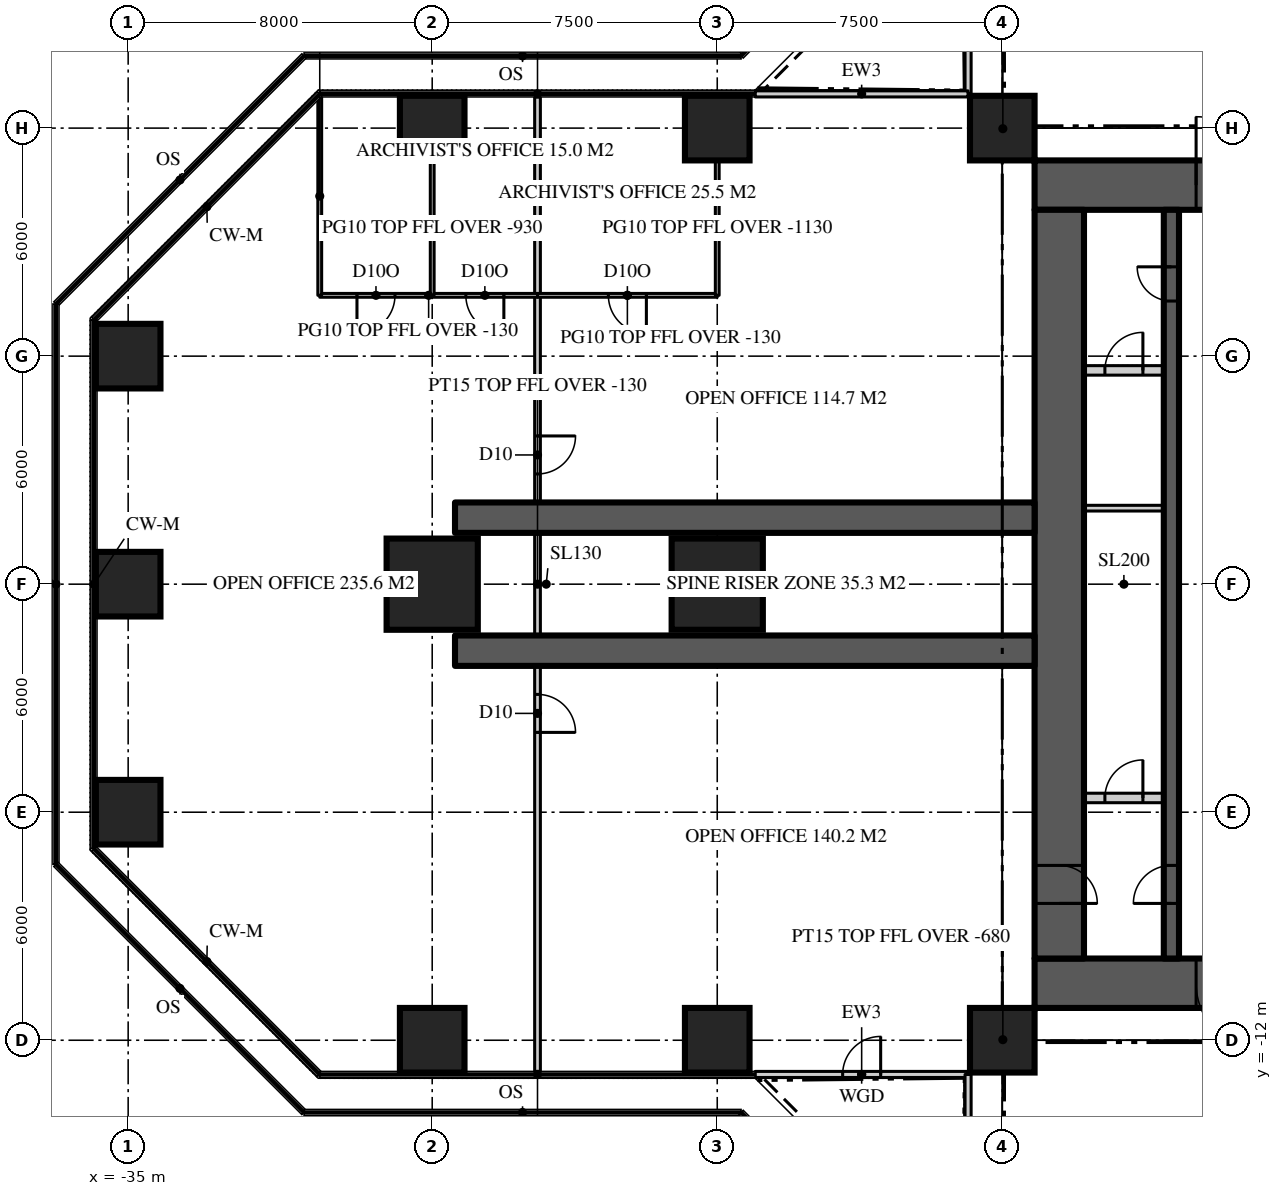
"""IFC4 building model, lengths in metres.
Left out: names, types, materials, properties, quantities, classifications, styles, units other than length and angle.
Written with IfcOpenShell. Run it as: python <this file> out.ifc"""

import sys

from ifc_helpers import new_model, si_unit, direction, frame, frame_2d, origin, origin_2d, place, context, subcontext, project, spatial, rectangle, extrude, element, fill, save


model = new_model("IFC4")
c1 = context("Model", 3, precision=1e-05, world=origin(), true_north=direction((0.0, 1.0)))
c2 = subcontext(c1, "Body", "Model", "MODEL_VIEW")
j1 = project(units=[si_unit("LENGTHUNIT", "METRE"), si_unit("PLANEANGLEUNIT", "RADIAN")], contexts=[c1])
p1 = place(None, origin())
s1 = spatial("IfcSite", under=j1, at=p1, CompositionType="ELEMENT")
p2 = place(p1, origin())
s2 = spatial("IfcBuilding", under=s1, at=p2, CompositionType="ELEMENT")
p3 = place(p2, frame((0.0, 0.0, 159.3)))
s3 = spatial("IfcBuildingStorey", under=s2, at=p3, CompositionType="ELEMENT", Elevation=159.3)
p4 = place(p3, frame((-11.15, 10.5, 0.0), z_axis=(0.0, 0.0, 1.0), x_axis=(1.0, 0.0, 0.0)))
e1 = element("IfcWall", 1, at=p4, inside=s3, PredefinedType="SHEAR", context=c2, shape_type="SweptSolid", body=[
    extrude(rectangle(XDim=22.3, YDim=1.3, at=frame_2d((11.15, 0.0))), origin(), (0.0, 0.0, 1.0), 3.9),
])
p5 = place(p4, frame((4.25, 0.0, 0.0)))
e2 = element("IfcOpeningElement", 2, at=p5, cuts=e1, PredefinedType="OPENING", context=c2, shape_type="SweptSolid", body=[
    extrude(rectangle(XDim=1.8, YDim=2.2, at=frame_2d((0.9, 1.1))), frame((0.0, 0.66, 0.0), z_axis=(0.0, -1.0, 0.0), x_axis=(1.0, 0.0, 0.0)), (0.0, 0.0, 1.0), 1.32),
])
p6 = place(p4, frame((16.25, 0.0, 0.0)))
e3 = element("IfcOpeningElement", 3, at=p6, cuts=e1, PredefinedType="OPENING", context=c2, shape_type="SweptSolid", body=[
    extrude(rectangle(XDim=1.8, YDim=2.2, at=frame_2d((0.9, 1.1))), frame((0.0, 0.66, 0.0), z_axis=(0.0, -1.0, 0.0), x_axis=(1.0, 0.0, 0.0)), (0.0, 0.0, 1.0), 1.32),
])
p7 = place(p3, frame((11.15, -10.5, 0.0), z_axis=(0.0, 0.0, 1.0), x_axis=(-1.0, 0.0, 0.0)))
e4 = element("IfcWall", 4, at=p7, inside=s3, PredefinedType="SHEAR", context=c2, shape_type="SweptSolid", body=[
    extrude(rectangle(XDim=22.3, YDim=1.3, at=frame_2d((11.15, 0.0))), origin(), (0.0, 0.0, 1.0), 3.9),
])
p8 = place(p7, frame((16.25, 0.0, 0.0)))
e5 = element("IfcOpeningElement", 5, at=p8, cuts=e4, PredefinedType="OPENING", context=c2, shape_type="SweptSolid", body=[
    extrude(rectangle(XDim=1.8, YDim=2.2, at=frame_2d((0.9, 1.1))), frame((0.0, 0.66, 0.0), z_axis=(0.0, -1.0, 0.0), x_axis=(1.0, 0.0, 0.0)), (0.0, 0.0, 1.0), 1.32),
])
p9 = place(p7, frame((4.25, 0.0, 0.0)))
e6 = element("IfcOpeningElement", 6, at=p9, cuts=e4, PredefinedType="OPENING", context=c2, shape_type="SweptSolid", body=[
    extrude(rectangle(XDim=1.8, YDim=2.2, at=frame_2d((0.9, 1.1))), frame((0.0, 0.66, 0.0), z_axis=(0.0, -1.0, 0.0), x_axis=(1.0, 0.0, 0.0)), (0.0, 0.0, 1.0), 1.32),
])
p10 = place(p3, frame((-10.5, 9.85, 0.0), z_axis=(0.0, 0.0, 1.0), x_axis=(0.0, -1.0, 0.0)))
e7 = element("IfcWall", 7, at=p10, inside=s3, PredefinedType="SHEAR", context=c2, shape_type="SweptSolid", body=[
    extrude(rectangle(XDim=19.7, YDim=1.3, at=frame_2d((9.85, 0.0))), origin(), (0.0, 0.0, 1.0), 3.9),
])
p11 = place(p10, frame((17.25, 0.0, 0.0)))
e8 = element("IfcOpeningElement", 8, at=p11, cuts=e7, PredefinedType="OPENING", context=c2, shape_type="SweptSolid", body=[
    extrude(rectangle(XDim=1.0, YDim=2.2, at=frame_2d((0.5, 1.1))), frame((0.0, 0.66, 0.0), z_axis=(0.0, -1.0, 0.0), x_axis=(1.0, 0.0, 0.0)), (0.0, 0.0, 1.0), 1.32),
])
for number, where, z_axis, x_axis in (
    (9, (-11.15, 1.75, 0.0), (0.0, 0.0, 1.0), (-1.0, 0.0, 0.0)),
    (10, (-11.15, -1.75, 0.0), (0.0, 0.0, 1.0), (-1.0, 0.0, 0.0)),
):
    element("IfcWall", number, at=place(p3, frame(where, z_axis=z_axis, x_axis=x_axis)), inside=s3, PredefinedType="SHEAR", context=c2, shape_type="SweptSolid", body=[
        extrude(rectangle(XDim=15.25, YDim=0.8, at=frame_2d((7.625, 0.0))), origin(), (0.0, 0.0, 1.0), 3.9),
    ])
for number, where, z_axis, x_axis in (
    (11, (-27.0, -12.0, 0.0), (0.0, 0.0, 1.0), (1.0, 0.0, 0.0)),
    (12, (-19.5, -12.0, 0.0), (0.0, 0.0, 1.0), (1.0, 0.0, 0.0)),
    (13, (-12.0, -12.0, 0.0), (0.0, 0.0, 1.0), (1.0, 0.0, 0.0)),
    (14, (-35.0, -6.0, 0.0), (0.0, 0.0, 1.0), (1.0, 0.0, 0.0)),
    (15, (-35.0, 0.0, 0.0), (0.0, 0.0, 1.0), (1.0, 0.0, 0.0)),
):
    element("IfcColumn", number, at=place(p3, frame(where, z_axis=z_axis, x_axis=x_axis)), inside=s3, PredefinedType="COLUMN", context=c2, shape_type="SweptSolid", body=[
        extrude(rectangle(XDim=1.7, YDim=1.7, at=origin_2d()), origin(), (0.0, 0.0, 1.0), 3.9),
    ])
for number, where, z_axis, x_axis in (
    (16, (-27.0, 0.0, 0.0), (0.0, 0.0, 1.0), (1.0, 0.0, 0.0)),
    (17, (-19.5, 0.0, 0.0), (0.0, 0.0, 1.0), (1.0, 0.0, 0.0)),
):
    element("IfcColumn", number, at=place(p3, frame(where, z_axis=z_axis, x_axis=x_axis)), inside=s3, PredefinedType="COLUMN", context=c2, shape_type="SweptSolid", body=[
        extrude(rectangle(XDim=2.4, YDim=2.4, at=origin_2d()), origin(), (0.0, 0.0, 1.0), 3.9),
    ])
for number, where, z_axis, x_axis in (
    (18, (-35.0, 6.0, 0.0), (0.0, 0.0, 1.0), (1.0, 0.0, 0.0)),
    (19, (-27.0, 12.0, 0.0), (0.0, 0.0, 1.0), (1.0, 0.0, 0.0)),
    (20, (-19.5, 12.0, 0.0), (0.0, 0.0, 1.0), (1.0, 0.0, 0.0)),
    (21, (-12.0, 12.0, 0.0), (0.0, 0.0, 1.0), (1.0, 0.0, 0.0)),
):
    element("IfcColumn", number, at=place(p3, frame(where, z_axis=z_axis, x_axis=x_axis)), inside=s3, PredefinedType="COLUMN", context=c2, shape_type="SweptSolid", body=[
        extrude(rectangle(XDim=1.7, YDim=1.7, at=origin_2d()), origin(), (0.0, 0.0, 1.0), 3.9),
    ])
p12 = place(p3, frame((-12.9, 18.5, 0.0), z_axis=(0.0, 0.0, 1.0), x_axis=(0.0, -1.0, 0.0)))
e22 = element("IfcWall", 22, at=p12, inside=s3, PredefinedType="SOLIDWALL", context=c2, shape_type="SweptSolid", body=[
    extrude(rectangle(XDim=5.6, YDim=0.16, at=frame_2d((2.8, 0.0))), origin(), (0.0, 0.0, 1.0), 3.77),
])
p13 = place(p12, frame((2.3, 0.0, 0.0)))
e23 = element("IfcOpeningElement", 23, at=p13, cuts=e22, PredefinedType="OPENING", context=c2, shape_type="SweptSolid", body=[
    extrude(rectangle(XDim=1.0, YDim=2.2, at=frame_2d((0.5, 1.1))), frame((0.0, 0.09, 0.0), z_axis=(0.0, -1.0, 0.0), x_axis=(1.0, 0.0, 0.0)), (0.0, 0.0, 1.0), 0.18),
])
p14 = place(p3, frame((-12.9, 12.9, 0.0), z_axis=(0.0, 0.0, 1.0), x_axis=(-1.0, 0.0, 0.0)))
e24 = element("IfcWall", 24, at=p14, inside=s3, PredefinedType="SOLIDWALL", context=c2, shape_type="SweptSolid", body=[
    extrude(rectangle(XDim=5.6, YDim=0.16, at=frame_2d((2.8, 0.0))), origin(), (0.0, 0.0, 1.0), 3.77),
])
p15 = place(p3, frame((-18.5, -12.9, 0.0), z_axis=(0.0, 0.0, 1.0), x_axis=(1.0, 0.0, 0.0)))
e25 = element("IfcWall", 25, at=p15, inside=s3, PredefinedType="SOLIDWALL", context=c2, shape_type="SweptSolid", body=[
    extrude(rectangle(XDim=5.6, YDim=0.16, at=frame_2d((2.8, 0.0))), origin(), (0.0, 0.0, 1.0), 3.77),
])
p16 = place(p15, frame((2.3, 0.0, 0.0)))
e26 = element("IfcOpeningElement", 26, at=p16, cuts=e25, PredefinedType="OPENING", context=c2, shape_type="SweptSolid", body=[
    extrude(rectangle(XDim=1.0, YDim=2.2, at=frame_2d((0.5, 1.1))), frame((0.0, 0.09, 0.0), z_axis=(0.0, -1.0, 0.0), x_axis=(1.0, 0.0, 0.0)), (0.0, 0.0, 1.0), 0.18),
])
p17 = place(p3, frame((-12.9, -12.9, 0.0), z_axis=(0.0, 0.0, 1.0), x_axis=(0.0, -1.0, 0.0)))
e27 = element("IfcWall", 27, at=p17, inside=s3, PredefinedType="SOLIDWALL", context=c2, shape_type="SweptSolid", body=[
    extrude(rectangle(XDim=5.6, YDim=0.16, at=frame_2d((2.8, 0.0))), origin(), (0.0, 0.0, 1.0), 3.77),
])
p18 = place(p3, frame((-7.55, -9.85, 0.0), z_axis=(0.0, 0.0, 1.0), x_axis=(0.0, 1.0, 0.0)))
e28 = element("IfcWall", 28, at=p18, inside=s3, PredefinedType="SHEAR", context=c2, shape_type="SweptSolid", body=[
    extrude(rectangle(XDim=19.7, YDim=0.4, at=frame_2d((9.85, 0.0))), origin(), (0.0, 0.0, 1.0), 3.9),
])
p19 = place(p18, frame((1.45, 0.0, 0.0)))
e29 = element("IfcOpeningElement", 29, at=p19, cuts=e28, PredefinedType="OPENING", context=c2, shape_type="SweptSolid", body=[
    extrude(rectangle(XDim=1.0, YDim=2.2, at=frame_2d((0.5, 1.1))), frame((0.0, 0.21, 0.0), z_axis=(0.0, -1.0, 0.0), x_axis=(1.0, 0.0, 0.0)), (0.0, 0.0, 1.0), 0.42),
])
p20 = place(p18, frame((17.3, 0.0, 0.0)))
e30 = element("IfcOpeningElement", 30, at=p20, cuts=e28, PredefinedType="OPENING", context=c2, shape_type="SweptSolid", body=[
    extrude(rectangle(XDim=0.9, YDim=2.1, at=frame_2d((0.45, 1.05))), frame((0.0, 0.21, 0.0), z_axis=(0.0, -1.0, 0.0), x_axis=(1.0, 0.0, 0.0)), (0.0, 0.0, 1.0), 0.42),
])
p21 = place(p3, frame((-9.85, 5.625, 0.0), z_axis=(0.0, 0.0, 1.0), x_axis=(1.0, 0.0, 0.0)))
e31 = element("IfcWall", 31, at=p21, inside=s3, PredefinedType="SOLIDWALL", context=c2, shape_type="SweptSolid", body=[
    extrude(rectangle(XDim=2.1, YDim=0.25, at=frame_2d((1.05, 0.0))), origin(), (0.0, 0.0, 1.0), 3.7),
])
p22 = place(p21, frame((0.55, 0.0, 0.0)))
e32 = element("IfcOpeningElement", 32, at=p22, cuts=e31, PredefinedType="OPENING", context=c2, shape_type="SweptSolid", body=[
    extrude(rectangle(XDim=1.0, YDim=2.2, at=frame_2d((0.5, 1.1))), frame((0.0, 0.135, 0.0), z_axis=(0.0, -1.0, 0.0), x_axis=(1.0, 0.0, 0.0)), (0.0, 0.0, 1.0), 0.27),
])
p23 = place(p3, frame((-9.85, -5.625, 0.0), z_axis=(0.0, 0.0, 1.0), x_axis=(1.0, 0.0, 0.0)))
e33 = element("IfcWall", 33, at=p23, inside=s3, PredefinedType="SOLIDWALL", context=c2, shape_type="SweptSolid", body=[
    extrude(rectangle(XDim=2.1, YDim=0.25, at=frame_2d((1.05, 0.0))), origin(), (0.0, 0.0, 1.0), 3.7),
])
p24 = place(p23, frame((0.55, 0.0, 0.0)))
e34 = element("IfcOpeningElement", 34, at=p24, cuts=e33, PredefinedType="OPENING", context=c2, shape_type="SweptSolid", body=[
    extrude(rectangle(XDim=1.0, YDim=2.2, at=frame_2d((0.5, 1.1))), frame((0.0, 0.135, 0.0), z_axis=(0.0, -1.0, 0.0), x_axis=(1.0, 0.0, 0.0)), (0.0, 0.0, 1.0), 0.27),
])
p25 = place(p3, frame((-24.229, 12.82, 0.0), z_axis=(0.0, 0.0, 1.0), x_axis=(0.0, -1.0, 0.0)))
e35 = element("IfcWall", 35, at=p25, inside=s3, PredefinedType="PARTITIONING", context=c2, shape_type="SweptSolid", body=[
    extrude(rectangle(XDim=25.64, YDim=0.15, at=frame_2d((12.82, 0.0))), origin(), (0.0, 0.0, 1.0), 3.77),
])
p26 = place(p25, frame((15.72, 0.0, 0.0)))
e36 = element("IfcOpeningElement", 36, at=p26, cuts=e35, PredefinedType="OPENING", context=c2, shape_type="SweptSolid", body=[
    extrude(rectangle(XDim=1.0, YDim=2.2, at=frame_2d((0.5, 1.1))), frame((0.0, 0.085, 0.0), z_axis=(0.0, -1.0, 0.0), x_axis=(1.0, 0.0, 0.0)), (0.0, 0.0, 1.0), 0.17),
])
p27 = place(p25, frame((8.92, 0.0, 0.0)))
e37 = element("IfcOpeningElement", 37, at=p27, cuts=e35, PredefinedType="OPENING", context=c2, shape_type="SweptSolid", body=[
    extrude(rectangle(XDim=1.0, YDim=2.2, at=frame_2d((0.5, 1.1))), frame((0.0, 0.085, 0.0), z_axis=(0.0, -1.0, 0.0), x_axis=(1.0, 0.0, 0.0)), (0.0, 0.0, 1.0), 0.17),
])
p28 = place(p3, frame((-19.5, 7.6, 0.0), z_axis=(0.0, 0.0, 1.0), x_axis=(-1.0, 0.0, 0.0)))
e38 = element("IfcWall", 38, at=p28, inside=s3, PredefinedType="PARTITIONING", context=c2, shape_type="SweptSolid", body=[
    extrude(rectangle(XDim=4.729, YDim=0.1, at=frame_2d((2.365, 0.0))), origin(), (0.0, 0.0, 1.0), 3.77),
])
p29 = place(p28, frame((1.865, 0.0, 0.0)))
e39 = element("IfcOpeningElement", 39, at=p29, cuts=e38, PredefinedType="OPENING", context=c2, shape_type="SweptSolid", body=[
    extrude(rectangle(XDim=1.0, YDim=2.2, at=frame_2d((0.5, 1.1))), frame((0.0, 0.06, 0.0), z_axis=(0.0, -1.0, 0.0), x_axis=(1.0, 0.0, 0.0)), (0.0, 0.0, 1.0), 0.12),
])
p30 = place(p3, frame((-24.229, 7.6, 0.0), z_axis=(0.0, 0.0, 1.0), x_axis=(-1.0, 0.0, 0.0)))
e40 = element("IfcWall", 40, at=p30, inside=s3, PredefinedType="PARTITIONING", context=c2, shape_type="SweptSolid", body=[
    extrude(rectangle(XDim=5.73, YDim=0.1, at=frame_2d((2.865, 0.0))), origin(), (0.0, 0.0, 1.0), 3.77),
])
p31 = place(p30, frame((0.885, 0.0, 0.0)))
e41 = element("IfcOpeningElement", 41, at=p31, cuts=e40, PredefinedType="OPENING", context=c2, shape_type="SweptSolid", body=[
    extrude(rectangle(XDim=1.0, YDim=2.2, at=frame_2d((0.5, 1.1))), frame((0.0, 0.06, 0.0), z_axis=(0.0, -1.0, 0.0), x_axis=(1.0, 0.0, 0.0)), (0.0, 0.0, 1.0), 0.12),
])
p32 = place(p30, frame((3.75, 0.0, 0.0)))
e42 = element("IfcOpeningElement", 42, at=p32, cuts=e40, PredefinedType="OPENING", context=c2, shape_type="SweptSolid", body=[
    extrude(rectangle(XDim=1.0, YDim=2.2, at=frame_2d((0.5, 1.1))), frame((0.0, 0.06, 0.0), z_axis=(0.0, -1.0, 0.0), x_axis=(1.0, 0.0, 0.0)), (0.0, 0.0, 1.0), 0.12),
])
p33 = place(p3, frame((-19.5, 7.6, 0.0), z_axis=(0.0, 0.0, 1.0), x_axis=(0.0, 1.0, 0.0)))
e43 = element("IfcWall", 43, at=p33, inside=s3, PredefinedType="PARTITIONING", context=c2, shape_type="SweptSolid", body=[
    extrude(rectangle(XDim=3.55, YDim=0.1, at=frame_2d((1.775, 0.0))), origin(), (0.0, 0.0, 1.0), 2.77),
])
p34 = place(p3, frame((-27.0, 7.6, 0.0), z_axis=(0.0, 0.0, 1.0), x_axis=(0.0, 1.0, 0.0)))
e44 = element("IfcWall", 44, at=p34, inside=s3, PredefinedType="PARTITIONING", context=c2, shape_type="SweptSolid", body=[
    extrude(rectangle(XDim=3.55, YDim=0.1, at=frame_2d((1.775, 0.0))), origin(), (0.0, 0.0, 1.0), 2.97),
])
p35 = place(p3, frame((-29.959, 7.6, 0.0), z_axis=(0.0, 0.0, 1.0), x_axis=(0.0, 1.0, 0.0)))
e45 = element("IfcWall", 45, at=p35, inside=s3, PredefinedType="PARTITIONING", context=c2, shape_type="SweptSolid", body=[
    extrude(rectangle(XDim=5.22, YDim=0.1, at=frame_2d((2.61, 0.0))), origin(), (0.0, 0.0, 1.0), 3.77),
])
for number, where, z_axis, x_axis in (
    (46, (-11.15, 11.15, 0.0), (0.0, 0.0, 1.0), (-0.707, 0.707, 0.0)),
    (47, (-11.15, -11.15, 0.0), (0.0, 0.0, 1.0), (-0.707, -0.707, 0.0)),
):
    element("IfcWall", number, at=place(p3, frame(where, z_axis=z_axis, x_axis=x_axis)), inside=s3, PredefinedType="PARTITIONING", context=c2, shape_type="SweptSolid", body=[
        extrude(rectangle(XDim=2.362, YDim=0.15, at=frame_2d((1.181, 0.0))), origin(), (0.0, 0.0, 1.0), 3.22),
    ])
p36 = place(p3, frame((-9.85, 2.0, 0.0), z_axis=(0.0, 0.0, 1.0), x_axis=(1.0, 0.0, 0.0)))
e48 = element("IfcWall", 48, at=p36, inside=s3, PredefinedType="SOLIDWALL", context=c2, shape_type="SweptSolid", body=[
    extrude(rectangle(XDim=2.1, YDim=0.15, at=frame_2d((1.05, 0.0))), origin(), (0.0, 0.0, 1.0), 3.77),
])
p37 = place(p16, origin())
e49 = element("IfcDoor", 49, at=p37, inside=s3, OperationType="SINGLE_SWING_RIGHT", PredefinedType="DOOR", context=c2, shape_type="SweptSolid", body=[
    extrude(rectangle(XDim=1.0, YDim=2.2, at=frame_2d((0.5, 1.1))), frame((0.0, 0.025, 0.0), z_axis=(0.0, -1.0, 0.0), x_axis=(1.0, 0.0, 0.0)), (0.0, 0.0, 1.0), 0.05),
])
fill(e26, e49)
p38 = place(p5, origin())
e50 = element("IfcDoor", 50, at=p38, inside=s3, OperationType="DOUBLE_DOOR_DOUBLE_SWING", PredefinedType="DOOR", context=c2, shape_type="SweptSolid", body=[
    extrude(rectangle(XDim=1.8, YDim=2.2, at=frame_2d((0.9, 1.1))), frame((0.0, 0.025, 0.0), z_axis=(0.0, -1.0, 0.0), x_axis=(1.0, 0.0, 0.0)), (0.0, 0.0, 1.0), 0.05),
])
fill(e2, e50)
p39 = place(p8, origin())
e51 = element("IfcDoor", 51, at=p39, inside=s3, OperationType="DOUBLE_DOOR_DOUBLE_SWING", PredefinedType="DOOR", context=c2, shape_type="SweptSolid", body=[
    extrude(rectangle(XDim=1.8, YDim=2.2, at=frame_2d((0.9, 1.1))), frame((0.0, 0.025, 0.0), z_axis=(0.0, -1.0, 0.0), x_axis=(1.0, 0.0, 0.0)), (0.0, 0.0, 1.0), 0.05),
])
fill(e5, e51)
p40 = place(p19, origin())
e52 = element("IfcDoor", 52, at=p40, inside=s3, OperationType="SINGLE_SWING_LEFT", PredefinedType="DOOR", context=c2, shape_type="SweptSolid", body=[
    extrude(rectangle(XDim=1.0, YDim=2.2, at=frame_2d((0.5, 1.1))), frame((0.0, 0.025, 0.0), z_axis=(0.0, -1.0, 0.0), x_axis=(1.0, 0.0, 0.0)), (0.0, 0.0, 1.0), 0.05),
])
fill(e29, e52)
p41 = place(p11, origin())
e53 = element("IfcDoor", 53, at=p41, inside=s3, OperationType="SINGLE_SWING_RIGHT", PredefinedType="DOOR", context=c2, shape_type="SweptSolid", body=[
    extrude(rectangle(XDim=1.0, YDim=2.2, at=frame_2d((0.5, 1.1))), frame((0.0, 0.025, 0.0), z_axis=(0.0, -1.0, 0.0), x_axis=(1.0, 0.0, 0.0)), (0.0, 0.0, 1.0), 0.05),
])
fill(e8, e53)
p42 = place(p20, origin())
e54 = element("IfcDoor", 54, at=p42, inside=s3, OperationType="SINGLE_SWING_RIGHT", PredefinedType="DOOR", context=c2, shape_type="SweptSolid", body=[
    extrude(rectangle(XDim=0.9, YDim=2.1, at=frame_2d((0.45, 1.05))), frame((0.0, 0.025, 0.0), z_axis=(0.0, -1.0, 0.0), x_axis=(1.0, 0.0, 0.0)), (0.0, 0.0, 1.0), 0.05),
])
fill(e30, e54)
p43 = place(p26, origin())
e55 = element("IfcDoor", 55, at=p43, inside=s3, OperationType="SINGLE_SWING_RIGHT", PredefinedType="DOOR", context=c2, shape_type="SweptSolid", body=[
    extrude(rectangle(XDim=1.0, YDim=2.2, at=frame_2d((0.5, 1.1))), frame((0.0, 0.025, 0.0), z_axis=(0.0, -1.0, 0.0), x_axis=(1.0, 0.0, 0.0)), (0.0, 0.0, 1.0), 0.05),
])
fill(e36, e55)
p44 = place(p27, origin())
e56 = element("IfcDoor", 56, at=p44, inside=s3, OperationType="SINGLE_SWING_LEFT", PredefinedType="DOOR", context=c2, shape_type="SweptSolid", body=[
    extrude(rectangle(XDim=1.0, YDim=2.2, at=frame_2d((0.5, 1.1))), frame((0.0, 0.025, 0.0), z_axis=(0.0, -1.0, 0.0), x_axis=(1.0, 0.0, 0.0)), (0.0, 0.0, 1.0), 0.05),
])
fill(e37, e56)
p45 = place(p29, origin())
e57 = element("IfcDoor", 57, at=p45, inside=s3, OperationType="SINGLE_SWING_LEFT", PredefinedType="DOOR", context=c2, shape_type="SweptSolid", body=[
    extrude(rectangle(XDim=1.0, YDim=2.2, at=frame_2d((0.5, 1.1))), frame((0.0, 0.025, 0.0), z_axis=(0.0, -1.0, 0.0), x_axis=(1.0, 0.0, 0.0)), (0.0, 0.0, 1.0), 0.05),
])
fill(e39, e57)
p46 = place(p31, origin())
e58 = element("IfcDoor", 58, at=p46, inside=s3, OperationType="SINGLE_SWING_LEFT", PredefinedType="DOOR", context=c2, shape_type="SweptSolid", body=[
    extrude(rectangle(XDim=1.0, YDim=2.2, at=frame_2d((0.5, 1.1))), frame((0.0, 0.025, 0.0), z_axis=(0.0, -1.0, 0.0), x_axis=(1.0, 0.0, 0.0)), (0.0, 0.0, 1.0), 0.05),
])
fill(e41, e58)
p47 = place(p32, origin())
e59 = element("IfcDoor", 59, at=p47, inside=s3, OperationType="SINGLE_SWING_RIGHT", PredefinedType="DOOR", context=c2, shape_type="SweptSolid", body=[
    extrude(rectangle(XDim=1.0, YDim=2.2, at=frame_2d((0.5, 1.1))), frame((0.0, 0.025, 0.0), z_axis=(0.0, -1.0, 0.0), x_axis=(1.0, 0.0, 0.0)), (0.0, 0.0, 1.0), 0.05),
])
fill(e42, e59)
p48 = place(p22, origin())
e60 = element("IfcDoor", 60, at=p48, inside=s3, OperationType="SINGLE_SWING_RIGHT", PredefinedType="DOOR", context=c2, shape_type="SweptSolid", body=[
    extrude(rectangle(XDim=1.0, YDim=2.2, at=frame_2d((0.5, 1.1))), frame((0.0, 0.025, 0.0), z_axis=(0.0, -1.0, 0.0), x_axis=(1.0, 0.0, 0.0)), (0.0, 0.0, 1.0), 0.05),
])
fill(e32, e60)
p49 = place(p24, origin())
e61 = element("IfcDoor", 61, at=p49, inside=s3, OperationType="SINGLE_SWING_RIGHT", PredefinedType="DOOR", context=c2, shape_type="SweptSolid", body=[
    extrude(rectangle(XDim=1.0, YDim=2.2, at=frame_2d((0.5, 1.1))), frame((0.0, 0.025, 0.0), z_axis=(0.0, -1.0, 0.0), x_axis=(1.0, 0.0, 0.0)), (0.0, 0.0, 1.0), 0.05),
])
fill(e34, e61)
save(model, sys.argv[1])
